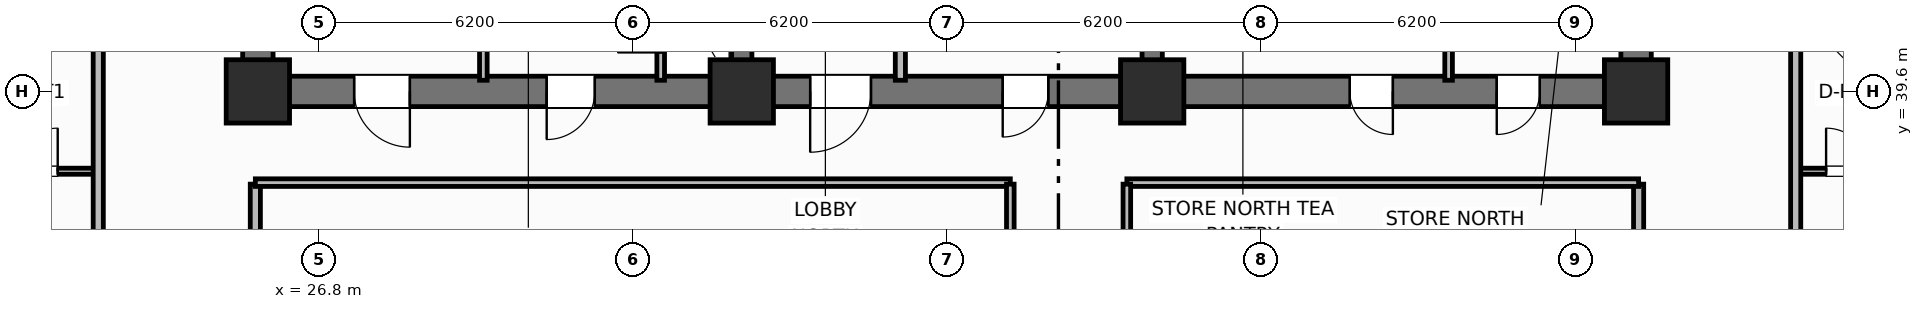
"""IFC4 building model, lengths in metres.
Left out: names, types, materials, properties, quantities, classifications, styles, units other than length and angle.
Written with IfcOpenShell. Run it as: python <this file> out.ifc"""

import sys

from ifc_helpers import new_model, si_unit, direction, frame, frame_2d, origin, origin_2d, place, context, subcontext, project, spatial, rectangle, extrude, element, fill, save


model = new_model("IFC4")
c1 = context("Model", 3, precision=1e-05, world=origin(), true_north=direction((0.0, 1.0)))
c2 = subcontext(c1, "Body", "Model", "MODEL_VIEW")
j1 = project(units=[si_unit("LENGTHUNIT", "METRE"), si_unit("PLANEANGLEUNIT", "RADIAN")], contexts=[c1])
p1 = place(None, origin())
s1 = spatial("IfcSite", under=j1, at=p1, CompositionType="ELEMENT")
p2 = place(p1, origin())
s2 = spatial("IfcBuilding", under=s1, at=p2, CompositionType="ELEMENT")
p3 = place(p2, frame((0.0, 0.0, 24.6)))
s3 = spatial("IfcBuildingStorey", under=s2, at=p3, CompositionType="ELEMENT", Elevation=24.6)
for number, where, z_axis, x_axis in (
    (1, (25.6, 39.9, 0.0), (0.0, 0.0, 1.0), (0.0, 1.0, 0.0)),
    (2, (52.8, 39.9, 0.0), (0.0, 0.0, 1.0), (0.0, 1.0, 0.0)),
):
    element("IfcWall", number, at=place(p3, frame(where, z_axis=z_axis, x_axis=x_axis)), inside=s3, PredefinedType="SHEAR", context=c2, shape_type="SweptSolid", body=[
        extrude(rectangle(XDim=5.6, YDim=0.6, at=frame_2d((2.8, 0.0))), origin(), (0.0, 0.0, 1.0), 4.2),
    ])
p4 = place(p3, frame((52.8, 39.6, 0.0), z_axis=(0.0, 0.0, 1.0), x_axis=(-1.0, 0.0, 0.0)))
e3 = element("IfcWall", 3, at=p4, inside=s3, PredefinedType="SHEAR", context=c2, shape_type="SweptSolid", body=[
    extrude(rectangle(XDim=27.2, YDim=0.6, at=frame_2d((13.6, 0.0))), origin(), (0.0, 0.0, 1.0), 4.2),
])
p5 = place(p4, frame((24.2, 0.0, 0.0)))
e4 = element("IfcOpeningElement", 4, at=p5, cuts=e3, PredefinedType="OPENING", context=c2, shape_type="SweptSolid", body=[
    extrude(rectangle(XDim=1.1, YDim=2.15, at=frame_2d((0.55, 1.075))), frame((0.0, 0.31, 0.0), z_axis=(0.0, -1.0, 0.0), x_axis=(1.0, 0.0, 0.0)), (0.0, 0.0, 1.0), 0.62),
])
p6 = place(p4, frame((20.55, 0.0, 0.0)))
e5 = element("IfcOpeningElement", 5, at=p6, cuts=e3, PredefinedType="OPENING", context=c2, shape_type="SweptSolid", body=[
    extrude(rectangle(XDim=0.95, YDim=2.1, at=frame_2d((0.475, 1.05))), frame((0.0, 0.31, 0.0), z_axis=(0.0, -1.0, 0.0), x_axis=(1.0, 0.0, 0.0)), (0.0, 0.0, 1.0), 0.62),
])
p7 = place(p4, frame((15.1, 0.0, 0.0)))
e6 = element("IfcOpeningElement", 6, at=p7, cuts=e3, PredefinedType="OPENING", context=c2, shape_type="SweptSolid", body=[
    extrude(rectangle(XDim=1.2, YDim=2.15, at=frame_2d((0.6, 1.075))), frame((0.0, 0.31, 0.0), z_axis=(0.0, -1.0, 0.0), x_axis=(1.0, 0.0, 0.0)), (0.0, 0.0, 1.0), 0.62),
])
p8 = place(p4, frame((11.6, 0.0, 0.0)))
e7 = element("IfcOpeningElement", 7, at=p8, cuts=e3, PredefinedType="OPENING", context=c2, shape_type="SweptSolid", body=[
    extrude(rectangle(XDim=0.9, YDim=2.1, at=frame_2d((0.45, 1.05))), frame((0.0, 0.31, 0.0), z_axis=(0.0, -1.0, 0.0), x_axis=(1.0, 0.0, 0.0)), (0.0, 0.0, 1.0), 0.62),
])
p9 = place(p4, frame((4.8, 0.0, 0.0)))
e8 = element("IfcOpeningElement", 8, at=p9, cuts=e3, PredefinedType="OPENING", context=c2, shape_type="SweptSolid", body=[
    extrude(rectangle(XDim=0.85, YDim=2.1, at=frame_2d((0.425, 1.05))), frame((0.0, 0.31, 0.0), z_axis=(0.0, -1.0, 0.0), x_axis=(1.0, 0.0, 0.0)), (0.0, 0.0, 1.0), 0.62),
])
p10 = place(p4, frame((1.9, 0.0, 0.0)))
e9 = element("IfcOpeningElement", 9, at=p10, cuts=e3, PredefinedType="OPENING", context=c2, shape_type="SweptSolid", body=[
    extrude(rectangle(XDim=0.85, YDim=2.1, at=frame_2d((0.425, 1.05))), frame((0.0, 0.31, 0.0), z_axis=(0.0, -1.0, 0.0), x_axis=(1.0, 0.0, 0.0)), (0.0, 0.0, 1.0), 0.62),
])
for number, where, z_axis, x_axis in (
    (10, (35.15, 39.9, 0.0), (0.0, 0.0, 1.0), (0.0, 1.0, 0.0)),
    (11, (43.25, 39.9, 0.0), (0.0, 0.0, 1.0), (0.0, 1.0, 0.0)),
):
    element("IfcWall", number, at=place(p3, frame(where, z_axis=z_axis, x_axis=x_axis)), inside=s3, PredefinedType="SHEAR", context=c2, shape_type="SweptSolid", body=[
        extrude(rectangle(XDim=5.6, YDim=0.4, at=frame_2d((2.8, 0.0))), origin(), (0.0, 0.0, 1.0), 4.2),
    ])
for number, where, z_axis, x_axis in (
    (12, (25.6, 39.6, 0.0), (0.0, 0.0, 1.0), (1.0, 0.0, 0.0)),
    (13, (35.15, 39.6, 0.0), (0.0, 0.0, 1.0), (1.0, 0.0, 0.0)),
    (14, (43.25, 39.6, 0.0), (0.0, 0.0, 1.0), (1.0, 0.0, 0.0)),
    (15, (52.8, 39.6, 0.0), (0.0, 0.0, 1.0), (1.0, 0.0, 0.0)),
):
    element("IfcColumn", number, at=place(p3, frame(where, z_axis=z_axis, x_axis=x_axis)), inside=s3, PredefinedType="COLUMN", context=c2, shape_type="SweptSolid", body=[
        extrude(rectangle(XDim=1.25, YDim=1.25, at=origin_2d()), origin(), (0.0, 0.0, 1.0), 4.2),
    ])
p11 = place(p3, frame((33.55, 39.82, 0.0), z_axis=(0.0, 0.0, 1.0), x_axis=(0.0, 1.0, 0.0)))
e16 = element("IfcWall", 16, at=p11, inside=s3, PredefinedType="PARTITIONING", context=c2, shape_type="SweptSolid", body=[
    extrude(rectangle(XDim=2.13, YDim=0.15, at=frame_2d((1.065, 0.0))), origin(), (0.0, 0.0, 1.0), 3.03),
])
p12 = place(p11, frame((0.55, 0.0, 0.0)))
e17 = element("IfcOpeningElement", 17, at=p12, cuts=e16, PredefinedType="OPENING", context=c2, shape_type="SweptSolid", body=[
    extrude(rectangle(XDim=0.85, YDim=2.05, at=frame_2d((0.425, 1.025))), frame((0.0, 0.085, 0.0), z_axis=(0.0, -1.0, 0.0), x_axis=(1.0, 0.0, 0.0)), (0.0, 0.0, 1.0), 0.17),
])
p13 = place(p3, frame((30.05, 39.82, 0.0), z_axis=(0.0, 0.0, 1.0), x_axis=(0.0, 1.0, 0.0)))
e18 = element("IfcWall", 18, at=p13, inside=s3, PredefinedType="PARTITIONING", context=c2, shape_type="SweptSolid", body=[
    extrude(rectangle(XDim=2.13, YDim=0.15, at=frame_2d((1.065, 0.0))), origin(), (0.0, 0.0, 1.0), 3.03),
])
p14 = place(p3, frame((38.28, 39.82, 0.0), z_axis=(0.0, 0.0, 1.0), x_axis=(0.0, 1.0, 0.0)))
e19 = element("IfcWall", 19, at=p14, inside=s3, PredefinedType="PARTITIONING", context=c2, shape_type="SweptSolid", body=[
    extrude(rectangle(XDim=2.73, YDim=0.2, at=frame_2d((1.365, 0.0))), origin(), (0.0, 0.0, 1.0), 3.03),
])
p15 = place(p3, frame((49.1, 39.82, 0.0), z_axis=(0.0, 0.0, 1.0), x_axis=(0.0, 1.0, 0.0)))
e20 = element("IfcWall", 20, at=p15, inside=s3, PredefinedType="PARTITIONING", context=c2, shape_type="SweptSolid", body=[
    extrude(rectangle(XDim=2.73, YDim=0.15, at=frame_2d((1.365, 0.0))), origin(), (0.0, 0.0, 1.0), 3.03),
])
for number, where, z_axis, x_axis in (
    (21, (25.55, 19.35, 0.0), (0.0, 0.0, 1.0), (0.0, 1.0, 0.0)),
    (22, (52.85, 19.35, 0.0), (0.0, 0.0, 1.0), (0.0, 1.0, 0.0)),
):
    element("IfcWall", number, at=place(p3, frame(where, z_axis=z_axis, x_axis=x_axis)), inside=s3, PredefinedType="PARTITIONING", context=c2, shape_type="SweptSolid", body=[
        extrude(rectangle(XDim=18.42, YDim=0.2, at=frame_2d((9.21, 0.0))), origin(), (0.0, 0.0, 1.0), 3.03),
    ])
p16 = place(p3, frame((25.55, 37.8, 0.0), z_axis=(0.0, 0.0, 1.0), x_axis=(1.0, 0.0, 0.0)))
e23 = element("IfcWall", 23, at=p16, inside=s3, PredefinedType="PARTITIONING", context=c2, shape_type="SweptSolid", body=[
    extrude(rectangle(XDim=14.9, YDim=0.15, at=frame_2d((7.45, 0.0))), origin(), (0.0, 0.0, 1.0), 3.03),
])
p17 = place(p3, frame((42.75, 37.8, 0.0), z_axis=(0.0, 0.0, 1.0), x_axis=(1.0, 0.0, 0.0)))
e24 = element("IfcWall", 24, at=p17, inside=s3, PredefinedType="PARTITIONING", context=c2, shape_type="SweptSolid", body=[
    extrude(rectangle(XDim=10.1, YDim=0.15, at=frame_2d((5.05, 0.0))), origin(), (0.0, 0.0, 1.0), 3.03),
])
p18 = place(p3, frame((40.45, 19.35, 0.0), z_axis=(0.0, 0.0, 1.0), x_axis=(0.0, 1.0, 0.0)))
e25 = element("IfcWall", 25, at=p18, inside=s3, PredefinedType="PARTITIONING", context=c2, shape_type="SweptSolid", body=[
    extrude(rectangle(XDim=18.42, YDim=0.15, at=frame_2d((9.21, 0.0))), origin(), (0.0, 0.0, 1.0), 3.03),
])
p19 = place(p18, frame((2.4, 0.0, 0.0)))
e26 = element("IfcOpeningElement", 26, at=p19, cuts=e25, PredefinedType="OPENING", context=c2, shape_type="SweptSolid", body=[
    extrude(rectangle(XDim=1.0, YDim=2.15, at=frame_2d((0.5, 1.075))), frame((0.0, 0.085, 0.0), z_axis=(0.0, -1.0, 0.0), x_axis=(1.0, 0.0, 0.0)), (0.0, 0.0, 1.0), 0.17),
])
p20 = place(p18, frame((11.4, 0.0, 0.0)))
e27 = element("IfcOpeningElement", 27, at=p20, cuts=e25, PredefinedType="OPENING", context=c2, shape_type="SweptSolid", body=[
    extrude(rectangle(XDim=1.0, YDim=2.15, at=frame_2d((0.5, 1.075))), frame((0.0, 0.085, 0.0), z_axis=(0.0, -1.0, 0.0), x_axis=(1.0, 0.0, 0.0)), (0.0, 0.0, 1.0), 0.17),
])
p21 = place(p3, frame((42.75, 19.35, 0.0), z_axis=(0.0, 0.0, 1.0), x_axis=(0.0, 1.0, 0.0)))
e28 = element("IfcWall", 28, at=p21, inside=s3, PredefinedType="PARTITIONING", context=c2, shape_type="SweptSolid", body=[
    extrude(rectangle(XDim=18.42, YDim=0.15, at=frame_2d((9.21, 0.0))), origin(), (0.0, 0.0, 1.0), 3.03),
])
p22 = place(p21, frame((5.5, 0.0, 0.0)))
e29 = element("IfcOpeningElement", 29, at=p22, cuts=e28, PredefinedType="OPENING", context=c2, shape_type="SweptSolid", body=[
    extrude(rectangle(XDim=1.0, YDim=2.15, at=frame_2d((0.5, 1.075))), frame((0.0, 0.085, 0.0), z_axis=(0.0, -1.0, 0.0), x_axis=(1.0, 0.0, 0.0)), (0.0, 0.0, 1.0), 0.17),
])
p23 = place(p3, frame((20.2, 38.025, 0.0), z_axis=(0.0, 0.0, 1.0), x_axis=(1.0, 0.0, 0.0)))
e30 = element("IfcWall", 30, at=p23, inside=s3, PredefinedType="PARTITIONING", context=c2, shape_type="SweptSolid", body=[
    extrude(rectangle(XDim=2.25, YDim=0.12, at=frame_2d((1.125, 0.0))), origin(), (0.0, 0.0, 1.0), 3.03),
])
p24 = place(p23, frame((0.6, 0.0, 0.0)))
e31 = element("IfcOpeningElement", 31, at=p24, cuts=e30, PredefinedType="OPENING", context=c2, shape_type="SweptSolid", body=[
    extrude(rectangle(XDim=0.85, YDim=2.1, at=frame_2d((0.425, 1.05))), frame((0.0, 0.07, 0.0), z_axis=(0.0, -1.0, 0.0), x_axis=(1.0, 0.0, 0.0)), (0.0, 0.0, 1.0), 0.14),
])
p25 = place(p3, frame((22.45, 19.45, 0.0), z_axis=(0.0, 0.0, 1.0), x_axis=(0.0, 1.0, 0.0)))
e32 = element("IfcWall", 32, at=p25, inside=s3, PredefinedType="PARTITIONING", context=c2, shape_type="SweptSolid", body=[
    extrude(rectangle(XDim=26.35, YDim=0.2, at=frame_2d((13.175, 0.0))), origin(), (0.0, 0.0, 1.0), 3.03),
])
p26 = place(p25, frame((2.5, 0.0, 0.0)))
e33 = element("IfcOpeningElement", 33, at=p26, cuts=e32, PredefinedType="OPENING", context=c2, shape_type="SweptSolid", body=[
    extrude(rectangle(XDim=1.0, YDim=2.15, at=frame_2d((0.5, 1.075))), frame((0.0, 0.11, 0.0), z_axis=(0.0, -1.0, 0.0), x_axis=(1.0, 0.0, 0.0)), (0.0, 0.0, 1.0), 0.22),
])
p27 = place(p25, frame((13.875, 0.0, 0.0)))
e34 = element("IfcOpeningElement", 34, at=p27, cuts=e32, PredefinedType="OPENING", context=c2, shape_type="SweptSolid", body=[
    extrude(rectangle(XDim=1.0, YDim=2.15, at=frame_2d((0.5, 1.075))), frame((0.0, 0.11, 0.0), z_axis=(0.0, -1.0, 0.0), x_axis=(1.0, 0.0, 0.0)), (0.0, 0.0, 1.0), 0.22),
])
p28 = place(p3, frame((55.95, 38.025, 0.0), z_axis=(0.0, 0.0, 1.0), x_axis=(1.0, 0.0, 0.0)))
e35 = element("IfcWall", 35, at=p28, inside=s3, PredefinedType="PARTITIONING", context=c2, shape_type="SweptSolid", body=[
    extrude(rectangle(XDim=2.25, YDim=0.12, at=frame_2d((1.125, 0.0))), origin(), (0.0, 0.0, 1.0), 3.03),
])
p29 = place(p28, frame((0.6, 0.0, 0.0)))
e36 = element("IfcOpeningElement", 36, at=p29, cuts=e35, PredefinedType="OPENING", context=c2, shape_type="SweptSolid", body=[
    extrude(rectangle(XDim=0.85, YDim=2.1, at=frame_2d((0.425, 1.05))), frame((0.0, 0.07, 0.0), z_axis=(0.0, -1.0, 0.0), x_axis=(1.0, 0.0, 0.0)), (0.0, 0.0, 1.0), 0.14),
])
p30 = place(p3, frame((55.95, 19.45, 0.0), z_axis=(0.0, 0.0, 1.0), x_axis=(0.0, 1.0, 0.0)))
e37 = element("IfcWall", 37, at=p30, inside=s3, PredefinedType="PARTITIONING", context=c2, shape_type="SweptSolid", body=[
    extrude(rectangle(XDim=26.35, YDim=0.2, at=frame_2d((13.175, 0.0))), origin(), (0.0, 0.0, 1.0), 3.03),
])
p31 = place(p30, frame((2.5, 0.0, 0.0)))
e38 = element("IfcOpeningElement", 38, at=p31, cuts=e37, PredefinedType="OPENING", context=c2, shape_type="SweptSolid", body=[
    extrude(rectangle(XDim=1.0, YDim=2.15, at=frame_2d((0.5, 1.075))), frame((0.0, 0.11, 0.0), z_axis=(0.0, -1.0, 0.0), x_axis=(1.0, 0.0, 0.0)), (0.0, 0.0, 1.0), 0.22),
])
p32 = place(p30, frame((13.875, 0.0, 0.0)))
e39 = element("IfcOpeningElement", 39, at=p32, cuts=e37, PredefinedType="OPENING", context=c2, shape_type="SweptSolid", body=[
    extrude(rectangle(XDim=1.0, YDim=2.15, at=frame_2d((0.5, 1.075))), frame((0.0, 0.11, 0.0), z_axis=(0.0, -1.0, 0.0), x_axis=(1.0, 0.0, 0.0)), (0.0, 0.0, 1.0), 0.22),
])
p33 = place(p12, origin())
e40 = element("IfcDoor", 40, at=p33, inside=s3, OperationType="SINGLE_SWING_LEFT", PredefinedType="TRAPDOOR", context=c2, shape_type="SweptSolid", body=[
    extrude(rectangle(XDim=0.85, YDim=2.05, at=frame_2d((0.425, 1.025))), frame((0.0, 0.025, 0.0), z_axis=(0.0, -1.0, 0.0), x_axis=(1.0, 0.0, 0.0)), (0.0, 0.0, 1.0), 0.05),
])
fill(e17, e40)
p34 = place(p24, origin())
e41 = element("IfcDoor", 41, at=p34, inside=s3, OperationType="SINGLE_SWING_RIGHT", PredefinedType="DOOR", context=c2, shape_type="SweptSolid", body=[
    extrude(rectangle(XDim=0.85, YDim=2.1, at=frame_2d((0.425, 1.05))), frame((0.0, 0.025, 0.0), z_axis=(0.0, -1.0, 0.0), x_axis=(1.0, 0.0, 0.0)), (0.0, 0.0, 1.0), 0.05),
])
fill(e31, e41)
p35 = place(p29, origin())
e42 = element("IfcDoor", 42, at=p35, inside=s3, OperationType="SINGLE_SWING_LEFT", PredefinedType="DOOR", context=c2, shape_type="SweptSolid", body=[
    extrude(rectangle(XDim=0.85, YDim=2.1, at=frame_2d((0.425, 1.05))), frame((0.0, 0.025, 0.0), z_axis=(0.0, -1.0, 0.0), x_axis=(1.0, 0.0, 0.0)), (0.0, 0.0, 1.0), 0.05),
])
fill(e36, e42)
p36 = place(p5, origin())
e43 = element("IfcDoor", 43, at=p36, inside=s3, OperationType="SINGLE_SWING_LEFT", PredefinedType="DOOR", context=c2, shape_type="SweptSolid", body=[
    extrude(rectangle(XDim=1.1, YDim=2.15, at=frame_2d((0.55, 1.075))), frame((0.0, 0.025, 0.0), z_axis=(0.0, -1.0, 0.0), x_axis=(1.0, 0.0, 0.0)), (0.0, 0.0, 1.0), 0.05),
])
fill(e4, e43)
p37 = place(p6, origin())
e44 = element("IfcDoor", 44, at=p37, inside=s3, OperationType="SINGLE_SWING_RIGHT", PredefinedType="DOOR", context=c2, shape_type="SweptSolid", body=[
    extrude(rectangle(XDim=0.95, YDim=2.1, at=frame_2d((0.475, 1.05))), frame((0.0, 0.025, 0.0), z_axis=(0.0, -1.0, 0.0), x_axis=(1.0, 0.0, 0.0)), (0.0, 0.0, 1.0), 0.05),
])
fill(e5, e44)
p38 = place(p7, origin())
e45 = element("IfcDoor", 45, at=p38, inside=s3, OperationType="SINGLE_SWING_RIGHT", PredefinedType="DOOR", context=c2, shape_type="SweptSolid", body=[
    extrude(rectangle(XDim=1.2, YDim=2.15, at=frame_2d((0.6, 1.075))), frame((0.0, 0.025, 0.0), z_axis=(0.0, -1.0, 0.0), x_axis=(1.0, 0.0, 0.0)), (0.0, 0.0, 1.0), 0.05),
])
fill(e6, e45)
p39 = place(p8, origin())
e46 = element("IfcDoor", 46, at=p39, inside=s3, OperationType="SINGLE_SWING_RIGHT", PredefinedType="DOOR", context=c2, shape_type="SweptSolid", body=[
    extrude(rectangle(XDim=0.9, YDim=2.1, at=frame_2d((0.45, 1.05))), frame((0.0, 0.025, 0.0), z_axis=(0.0, -1.0, 0.0), x_axis=(1.0, 0.0, 0.0)), (0.0, 0.0, 1.0), 0.05),
])
fill(e7, e46)
p40 = place(p9, origin())
e47 = element("IfcDoor", 47, at=p40, inside=s3, OperationType="SINGLE_SWING_LEFT", PredefinedType="DOOR", context=c2, shape_type="SweptSolid", body=[
    extrude(rectangle(XDim=0.85, YDim=2.1, at=frame_2d((0.425, 1.05))), frame((0.0, 0.025, 0.0), z_axis=(0.0, -1.0, 0.0), x_axis=(1.0, 0.0, 0.0)), (0.0, 0.0, 1.0), 0.05),
])
fill(e8, e47)
p41 = place(p10, origin())
e48 = element("IfcDoor", 48, at=p41, inside=s3, OperationType="SINGLE_SWING_RIGHT", PredefinedType="DOOR", context=c2, shape_type="SweptSolid", body=[
    extrude(rectangle(XDim=0.85, YDim=2.1, at=frame_2d((0.425, 1.05))), frame((0.0, 0.025, 0.0), z_axis=(0.0, -1.0, 0.0), x_axis=(1.0, 0.0, 0.0)), (0.0, 0.0, 1.0), 0.05),
])
fill(e9, e48)
save(model, sys.argv[1])
